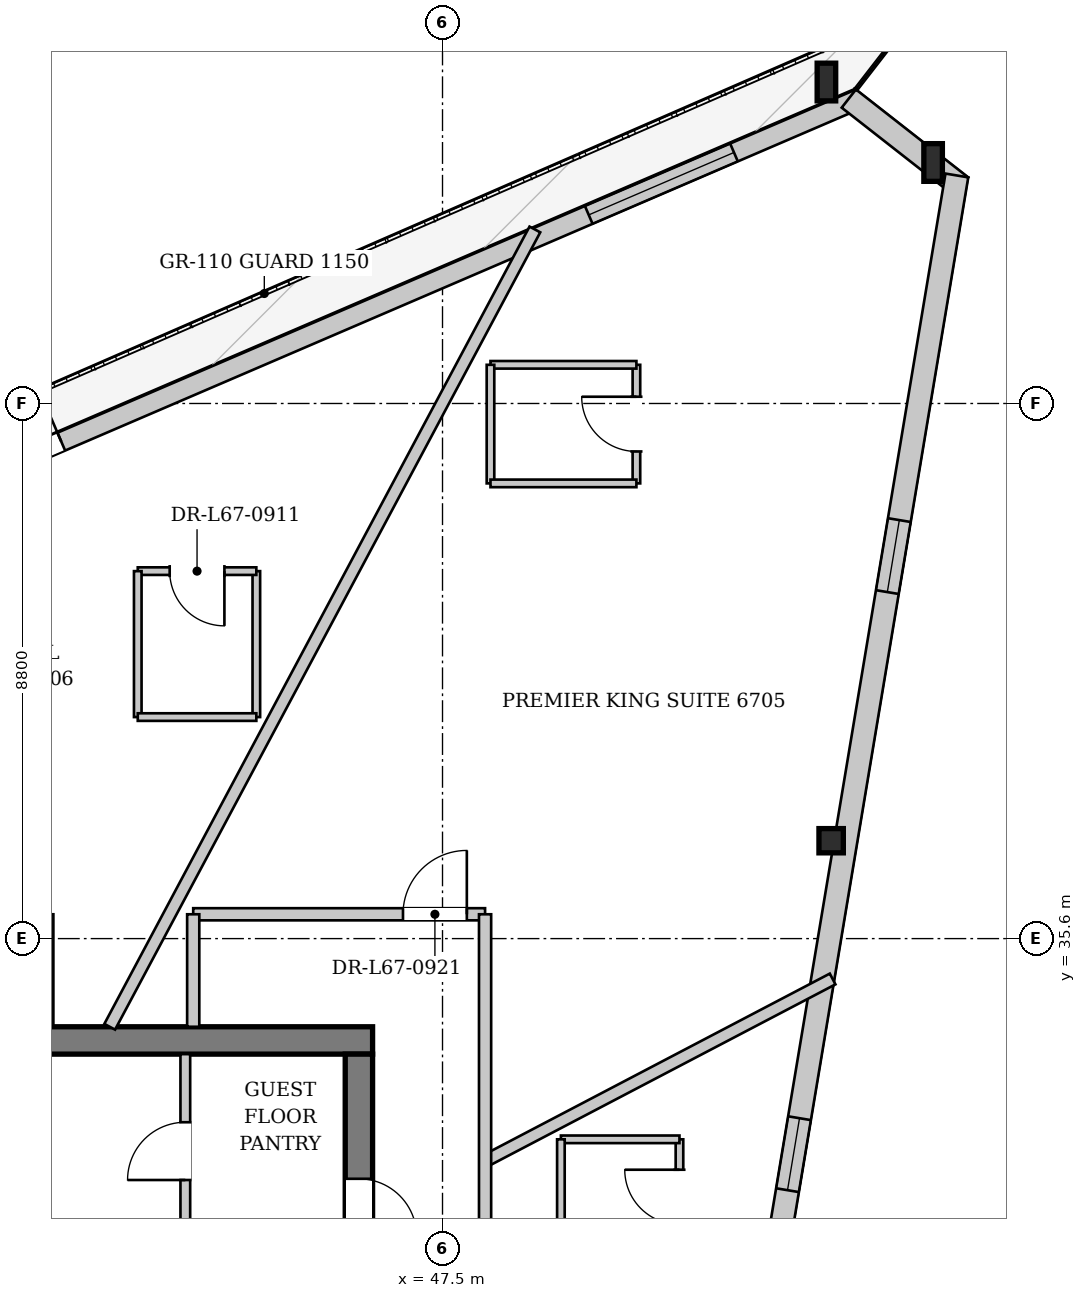
"""IFC4 building model, lengths in metres.
Left out: names, types, materials, properties, quantities, classifications, styles, units other than length and angle.
Written with IfcOpenShell. Run it as: python <this file> out.ifc"""

import sys

from ifc_helpers import new_model, si_unit, direction, frame, frame_2d, origin, origin_2d, place, context, subcontext, project, spatial, rectangle, i_section, extrude, source, transform, mapped, element, fill, save


model = new_model("IFC4")
c1 = context("Model", 3, precision=1e-05, world=origin(), true_north=direction((0.0, 1.0)))
c2 = subcontext(c1, "Body", "Model", "MODEL_VIEW")
j1 = project(units=[si_unit("LENGTHUNIT", "METRE"), si_unit("PLANEANGLEUNIT", "RADIAN")], contexts=[c1])
p1 = place(None, origin())
s1 = spatial("IfcSite", under=j1, at=p1, CompositionType="ELEMENT")
p2 = place(p1, origin())
s2 = spatial("IfcBuilding", under=s1, at=p2, CompositionType="ELEMENT")
p3 = place(p2, frame((0.0, 0.0, 252.5)))
s3 = spatial("IfcBuildingStorey", under=s2, at=p3, CompositionType="ELEMENT", Elevation=252.5)
m1 = source(origin(), c2, "Body", "SweptSolid", [
    extrude(i_section(OverallWidth=0.305, OverallDepth=0.62, WebThickness=0.021, FlangeThickness=0.04, at=origin_2d()), origin(), (0.0, 0.0, 1.0), 3.657),
])
p4 = place(p3, frame((56.146, 48.118, 0.0), z_axis=(-0.316024684734, 0.133846534198, 0.939262212549), x_axis=(-0.389995305072, -0.920816844993, 0.0)))
e1 = element("IfcColumn", 1, at=p4, inside=s3, PredefinedType="COLUMN", context=c2, shape_type="MappedRepresentation", body=[
    mapped(m1, transform((0.0, 0.0, 0.0), x_axis=(1.0, 0.0, 0.0), y_axis=(0.0, 1.0, 0.0), z_axis=(0.0, 0.0, 1.0), scale=1.0)),
])
m2 = source(origin(), c2, "Body", "SweptSolid", [
    extrude(i_section(OverallWidth=0.305, OverallDepth=0.62, WebThickness=0.021, FlangeThickness=0.04, at=origin_2d()), origin(), (0.0, 0.0, 1.0), 3.578),
])
p5 = place(p3, frame((54.299, 49.564, 0.0), z_axis=(-0.271302646107, 0.06830330703, 0.960067462455), x_axis=(-0.244142151433, -0.969739454644, 0.0)))
e2 = element("IfcColumn", 2, at=p5, inside=s3, PredefinedType="COLUMN", context=c2, shape_type="MappedRepresentation", body=[
    mapped(m2, transform((0.0, 0.0, 0.0), x_axis=(1.0, 0.0, 0.0), y_axis=(0.0, 1.0, 0.0), z_axis=(0.0, 0.0, 1.0), scale=1.0)),
])
m3 = source(origin(), c2, "Body", "SweptSolid", [
    extrude(i_section(OverallWidth=0.401, OverallDepth=0.399, WebThickness=0.022, FlangeThickness=0.034, at=origin_2d()), origin(), (0.0, 0.0, 1.0), 3.563),
])
p6 = place(p3, frame((54.281, 36.941, 0.0), z_axis=(-0.218659220589, 0.150478109813, 0.964128872983), x_axis=(-0.566912230463, -0.823778200095, 0.0)))
e3 = element("IfcColumn", 3, at=p6, inside=s3, PredefinedType="COLUMN", context=c2, shape_type="MappedRepresentation", body=[
    mapped(m3, transform((0.0, 0.0, 0.0), x_axis=(1.0, 0.0, 0.0), y_axis=(0.0, 1.0, 0.0), z_axis=(0.0, 0.0, 1.0), scale=1.0)),
])
p7 = place(p3, frame((34.037, 40.68, 0.0), z_axis=(0.0, 0.0, 1.0), x_axis=(0.918723841861, 0.394900623444, 0.0)))
e4 = element("IfcWall", 4, at=p7, inside=s3, PredefinedType="SOLIDWALL", context=c2, shape_type="SweptSolid", body=[
    extrude(rectangle(XDim=22.124, YDim=0.32, at=frame_2d((11.062, 0.0))), origin(), (0.0, 0.0, 1.0), 2.872),
])
p8 = place(p7, frame((6.33, 0.0, 0.0)))
e5 = element("IfcOpeningElement", 5, at=p8, cuts=e4, PredefinedType="OPENING", context=c2, shape_type="SweptSolid", body=[
    extrude(rectangle(XDim=1.5, YDim=2.3, at=frame_2d((0.75, 1.15))), frame((0.0, 0.17, 0.0), z_axis=(0.0, -1.0, 0.0), x_axis=(1.0, 0.0, 0.0)), (0.0, 0.0, 1.0), 0.34),
])
p9 = place(p7, frame((17.272, 0.0, 0.402)))
e6 = element("IfcOpeningElement", 6, at=p9, cuts=e4, PredefinedType="OPENING", context=c2, shape_type="SweptSolid", body=[
    extrude(rectangle(XDim=2.6, YDim=2.35, at=frame_2d((1.3, 1.175))), frame((0.0, 0.17, 0.0), z_axis=(0.0, -1.0, 0.0), x_axis=(1.0, 0.0, 0.0)), (0.0, 0.0, 1.0), 0.34),
])
p10 = place(p3, frame((54.182, 49.415, 0.0), z_axis=(0.0, 0.0, 1.0), x_axis=(0.787515983011, -0.616294228841, 0.0)))
e7 = element("IfcWall", 7, at=p10, inside=s3, PredefinedType="SOLIDWALL", context=c2, shape_type="SweptSolid", body=[
    extrude(rectangle(XDim=2.345, YDim=0.38, at=frame_2d((1.173, 0.0))), origin(), (0.0, 0.0, 1.0), 2.872),
])
p11 = place(p3, frame((55.959, 48.15, 0.0), z_axis=(0.0, 0.0, 1.0), x_axis=(-0.164634811141, -0.986354590885, 0.0)))
e8 = element("IfcWall", 8, at=p11, inside=s3, PredefinedType="SOLIDWALL", context=c2, shape_type="SweptSolid", body=[
    extrude(rectangle(XDim=22.664, YDim=0.38, at=frame_2d((11.332, 0.0))), origin(), (0.0, 0.0, 1.0), 2.872),
])
p12 = place(p11, frame((5.746, 0.0, 0.65)))
e9 = element("IfcOpeningElement", 9, at=p12, cuts=e8, PredefinedType="OPENING", context=c2, shape_type="SweptSolid", body=[
    extrude(rectangle(XDim=1.2, YDim=1.5, at=frame_2d((0.6, 0.75))), frame((0.0, 0.2, 0.0), z_axis=(0.0, -1.0, 0.0), x_axis=(1.0, 0.0, 0.0)), (0.0, 0.0, 1.0), 0.4),
])
p13 = place(p11, frame((15.718, 0.0, 0.65)))
e10 = element("IfcOpeningElement", 10, at=p13, cuts=e8, PredefinedType="OPENING", context=c2, shape_type="SweptSolid", body=[
    extrude(rectangle(XDim=1.2, YDim=1.5, at=frame_2d((0.6, 0.75))), frame((0.0, 0.2, 0.0), z_axis=(0.0, -1.0, 0.0), x_axis=(1.0, 0.0, 0.0)), (0.0, 0.0, 1.0), 0.4),
])
p14 = place(p3, frame((29.65, 33.925, 0.0), z_axis=(0.0, 0.0, 1.0), x_axis=(1.0, 0.0, 0.0)))
e11 = element("IfcWall", 11, at=p14, inside=s3, PredefinedType="SHEAR", context=c2, shape_type="SweptSolid", body=[
    extrude(rectangle(XDim=16.7, YDim=0.45, at=frame_2d((8.35, 0.0))), origin(), (0.0, 0.0, 1.0), 3.38),
])
p15 = place(p14, frame((1.45, 0.0, 0.0)))
e12 = element("IfcOpeningElement", 12, at=p15, cuts=e11, PredefinedType="OPENING", context=c2, shape_type="SweptSolid", body=[
    extrude(rectangle(XDim=0.95, YDim=2.1, at=frame_2d((0.475, 1.05))), frame((0.0, 0.235, 0.0), z_axis=(0.0, -1.0, 0.0), x_axis=(1.0, 0.0, 0.0)), (0.0, 0.0, 1.0), 0.47),
])
p16 = place(p14, frame((3.83, 0.0, 0.0)))
e13 = element("IfcOpeningElement", 13, at=p16, cuts=e11, PredefinedType="OPENING", context=c2, shape_type="SweptSolid", body=[
    extrude(rectangle(XDim=1.32, YDim=2.2, at=frame_2d((0.66, 1.1))), frame((0.0, 0.235, 0.0), z_axis=(0.0, -1.0, 0.0), x_axis=(1.0, 0.0, 0.0)), (0.0, 0.0, 1.0), 0.47),
])
p17 = place(p3, frame((46.125, 33.7, 0.0), z_axis=(0.0, 0.0, 1.0), x_axis=(0.0, -1.0, 0.0)))
e14 = element("IfcWall", 14, at=p17, inside=s3, PredefinedType="SHEAR", context=c2, shape_type="SweptSolid", body=[
    extrude(rectangle(XDim=14.2, YDim=0.45, at=frame_2d((7.1, 0.0))), origin(), (0.0, 0.0, 1.0), 3.38),
])
p18 = place(p17, frame((5.18, 0.0, 0.0)))
e15 = element("IfcOpeningElement", 15, at=p18, cuts=e14, PredefinedType="OPENING", context=c2, shape_type="SweptSolid", body=[
    extrude(rectangle(XDim=1.6, YDim=2.2, at=frame_2d((0.8, 1.1))), frame((0.0, 0.235, 0.0), z_axis=(0.0, -1.0, 0.0), x_axis=(1.0, 0.0, 0.0)), (0.0, 0.0, 1.0), 0.47),
])
p19 = place(p17, frame((2.05, 0.0, 0.0)))
e16 = element("IfcOpeningElement", 16, at=p19, cuts=e14, PredefinedType="OPENING", context=c2, shape_type="SweptSolid", body=[
    extrude(rectangle(XDim=0.95, YDim=2.1, at=frame_2d((0.475, 1.05))), frame((0.0, 0.235, 0.0), z_axis=(0.0, -1.0, 0.0), x_axis=(1.0, 0.0, 0.0)), (0.0, 0.0, 1.0), 0.47),
])
p20 = place(p3, frame((43.27, 30.68, 0.0), z_axis=(0.0, 0.0, 1.0), x_axis=(0.0, 1.0, 0.0)))
e17 = element("IfcWall", 17, at=p20, inside=s3, PredefinedType="PARTITIONING", context=c2, shape_type="SweptSolid", body=[
    extrude(rectangle(XDim=3.02, YDim=0.16, at=frame_2d((1.51, 0.0))), origin(), (0.0, 0.0, 1.0), 3.38),
])
p21 = place(p20, frame((0.95, 0.0, 0.0)))
e18 = element("IfcOpeningElement", 18, at=p21, cuts=e17, PredefinedType="OPENING", context=c2, shape_type="SweptSolid", body=[
    extrude(rectangle(XDim=0.95, YDim=2.1, at=frame_2d((0.475, 1.05))), frame((0.0, 0.09, 0.0), z_axis=(0.0, -1.0, 0.0), x_axis=(1.0, 0.0, 0.0)), (0.0, 0.0, 1.0), 0.18),
])
p22 = place(p3, frame((48.2, 31.942, 0.0), z_axis=(0.0, 0.0, 1.0), x_axis=(0.885861896698, 0.463949027349, 0.0)))
e19 = element("IfcWall", 19, at=p22, inside=s3, PredefinedType="PARTITIONING", context=c2, shape_type="SweptSolid", body=[
    extrude(rectangle(XDim=6.453, YDim=0.2, at=frame_2d((3.226, 0.0))), origin(), (0.0, 0.0, 1.0), 3.38),
])
p23 = place(p3, frame((42.027, 34.15, 0.0), z_axis=(0.0, 0.0, 1.0), x_axis=(0.47056606421, 0.882364765397, 0.0)))
e20 = element("IfcWall", 20, at=p23, inside=s3, PredefinedType="PARTITIONING", context=c2, shape_type="SweptSolid", body=[
    extrude(rectangle(XDim=14.86, YDim=0.2, at=frame_2d((7.43, 0.0))), origin(), (0.0, 0.0, 1.0), 3.38),
])
p24 = place(p3, frame((51.397, 30.399, 0.0), z_axis=(0.0, 0.0, 1.0), x_axis=(0.0, 1.0, 0.0)))
e21 = element("IfcWall", 21, at=p24, inside=s3, PredefinedType="PARTITIONING", context=c2, shape_type="SweptSolid", body=[
    extrude(rectangle(XDim=1.9, YDim=0.125, at=frame_2d((0.95, 0.0))), origin(), (0.0, 0.0, 1.0), 3.38),
])
p25 = place(p24, frame((0.5, 0.0, 0.0)))
e22 = element("IfcOpeningElement", 22, at=p25, cuts=e21, PredefinedType="OPENING", context=c2, shape_type="SweptSolid", body=[
    extrude(rectangle(XDim=0.9, YDim=2.1, at=frame_2d((0.45, 1.05))), frame((0.0, 0.073, 0.0), z_axis=(0.0, -1.0, 0.0), x_axis=(1.0, 0.0, 0.0)), (0.0, 0.0, 1.0), 0.145),
])
p26 = place(p3, frame((51.397, 32.299, 0.0), z_axis=(0.0, 0.0, 1.0), x_axis=(-1.0, 0.0, 0.0)))
e23 = element("IfcWall", 23, at=p26, inside=s3, PredefinedType="PARTITIONING", context=c2, shape_type="SweptSolid", body=[
    extrude(rectangle(XDim=1.95, YDim=0.125, at=frame_2d((0.975, 0.0))), origin(), (0.0, 0.0, 1.0), 3.38),
])
p27 = place(p3, frame((49.447, 32.299, 0.0), z_axis=(0.0, 0.0, 1.0), x_axis=(0.0, -1.0, 0.0)))
e24 = element("IfcWall", 24, at=p27, inside=s3, PredefinedType="PARTITIONING", context=c2, shape_type="SweptSolid", body=[
    extrude(rectangle(XDim=1.9, YDim=0.125, at=frame_2d((0.95, 0.0))), origin(), (0.0, 0.0, 1.0), 3.38),
])
p28 = place(p3, frame((50.689, 43.086, 0.0), z_axis=(0.0, 0.0, 1.0), x_axis=(0.0, 1.0, 0.0)))
e25 = element("IfcWall", 25, at=p28, inside=s3, PredefinedType="PARTITIONING", context=c2, shape_type="SweptSolid", body=[
    extrude(rectangle(XDim=1.95, YDim=0.125, at=frame_2d((0.975, 0.0))), origin(), (0.0, 0.0, 1.0), 3.38),
])
p29 = place(p28, frame((0.525, 0.0, 0.0)))
e26 = element("IfcOpeningElement", 26, at=p29, cuts=e25, PredefinedType="OPENING", context=c2, shape_type="SweptSolid", body=[
    extrude(rectangle(XDim=0.9, YDim=2.1, at=frame_2d((0.45, 1.05))), frame((0.0, 0.073, 0.0), z_axis=(0.0, -1.0, 0.0), x_axis=(1.0, 0.0, 0.0)), (0.0, 0.0, 1.0), 0.145),
])
p30 = place(p3, frame((50.689, 45.036, 0.0), z_axis=(0.0, 0.0, 1.0), x_axis=(-1.0, 0.0, 0.0)))
e27 = element("IfcWall", 27, at=p30, inside=s3, PredefinedType="PARTITIONING", context=c2, shape_type="SweptSolid", body=[
    extrude(rectangle(XDim=2.4, YDim=0.125, at=frame_2d((1.2, 0.0))), origin(), (0.0, 0.0, 1.0), 3.38),
])
p31 = place(p3, frame((48.289, 45.036, 0.0), z_axis=(0.0, 0.0, 1.0), x_axis=(0.0, -1.0, 0.0)))
e28 = element("IfcWall", 28, at=p31, inside=s3, PredefinedType="PARTITIONING", context=c2, shape_type="SweptSolid", body=[
    extrude(rectangle(XDim=1.95, YDim=0.125, at=frame_2d((0.975, 0.0))), origin(), (0.0, 0.0, 1.0), 3.38),
])
p32 = place(p3, frame((48.289, 43.086, 0.0), z_axis=(0.0, 0.0, 1.0), x_axis=(1.0, 0.0, 0.0)))
e29 = element("IfcWall", 29, at=p32, inside=s3, PredefinedType="PARTITIONING", context=c2, shape_type="SweptSolid", body=[
    extrude(rectangle(XDim=2.4, YDim=0.125, at=frame_2d((1.2, 0.0))), origin(), (0.0, 0.0, 1.0), 3.125),
])
p33 = place(p3, frame((44.438, 39.243, 0.0), z_axis=(0.0, 0.0, 1.0), x_axis=(0.0, 1.0, 0.0)))
e30 = element("IfcWall", 30, at=p33, inside=s3, PredefinedType="PARTITIONING", context=c2, shape_type="SweptSolid", body=[
    extrude(rectangle(XDim=2.4, YDim=0.125, at=frame_2d((1.2, 0.0))), origin(), (0.0, 0.0, 1.0), 3.38),
])
p34 = place(p3, frame((44.438, 41.643, 0.0), z_axis=(0.0, 0.0, 1.0), x_axis=(-1.0, 0.0, 0.0)))
e31 = element("IfcWall", 31, at=p34, inside=s3, PredefinedType="PARTITIONING", context=c2, shape_type="SweptSolid", body=[
    extrude(rectangle(XDim=1.95, YDim=0.125, at=frame_2d((0.975, 0.0))), origin(), (0.0, 0.0, 1.0), 3.125),
])
p35 = place(p34, frame((0.525, 0.0, 0.0)))
e32 = element("IfcOpeningElement", 32, at=p35, cuts=e31, PredefinedType="OPENING", context=c2, shape_type="SweptSolid", body=[
    extrude(rectangle(XDim=0.9, YDim=2.1, at=frame_2d((0.45, 1.05))), frame((0.0, 0.073, 0.0), z_axis=(0.0, -1.0, 0.0), x_axis=(1.0, 0.0, 0.0)), (0.0, 0.0, 1.0), 0.145),
])
p36 = place(p3, frame((42.488, 41.643, 0.0), z_axis=(0.0, 0.0, 1.0), x_axis=(0.0, -1.0, 0.0)))
e33 = element("IfcWall", 33, at=p36, inside=s3, PredefinedType="PARTITIONING", context=c2, shape_type="SweptSolid", body=[
    extrude(rectangle(XDim=2.4, YDim=0.125, at=frame_2d((1.2, 0.0))), origin(), (0.0, 0.0, 1.0), 3.38),
])
p37 = place(p3, frame((42.488, 39.243, 0.0), z_axis=(0.0, 0.0, 1.0), x_axis=(1.0, 0.0, 0.0)))
e34 = element("IfcWall", 34, at=p37, inside=s3, PredefinedType="PARTITIONING", context=c2, shape_type="SweptSolid", body=[
    extrude(rectangle(XDim=1.95, YDim=0.125, at=frame_2d((0.975, 0.0))), origin(), (0.0, 0.0, 1.0), 3.38),
])
p38 = place(p3, frame((41.0, 34.15, 0.0), z_axis=(0.0, 0.0, 1.0), x_axis=(0.0, 1.0, 0.0)))
e35 = element("IfcWall", 35, at=p38, inside=s3, PredefinedType="PARTITIONING", context=c2, shape_type="SweptSolid", body=[
    extrude(rectangle(XDim=1.85, YDim=0.2, at=frame_2d((0.925, 0.0))), origin(), (0.0, 0.0, 1.0), 3.38),
])
p39 = place(p3, frame((43.4, 36.0, 0.0), z_axis=(0.0, 0.0, 1.0), x_axis=(1.0, 0.0, 0.0)))
e36 = element("IfcWall", 36, at=p39, inside=s3, PredefinedType="PARTITIONING", context=c2, shape_type="SweptSolid", body=[
    extrude(rectangle(XDim=4.8, YDim=0.2, at=frame_2d((2.4, 0.0))), origin(), (0.0, 0.0, 1.0), 3.38),
])
p40 = place(p39, frame((3.45, 0.0, 0.0)))
e37 = element("IfcOpeningElement", 37, at=p40, cuts=e36, PredefinedType="OPENING", context=c2, shape_type="SweptSolid", body=[
    extrude(rectangle(XDim=1.05, YDim=2.2, at=frame_2d((0.525, 1.1))), frame((0.0, 0.11, 0.0), z_axis=(0.0, -1.0, 0.0), x_axis=(1.0, 0.0, 0.0)), (0.0, 0.0, 1.0), 0.22),
])
p41 = place(p3, frame((43.4, 34.15, 0.0), z_axis=(0.0, 0.0, 1.0), x_axis=(0.0, 1.0, 0.0)))
e38 = element("IfcWall", 38, at=p41, inside=s3, PredefinedType="PARTITIONING", context=c2, shape_type="SweptSolid", body=[
    extrude(rectangle(XDim=1.85, YDim=0.2, at=frame_2d((0.925, 0.0))), origin(), (0.0, 0.0, 1.0), 3.38),
])
p42 = place(p3, frame((48.2, 17.2, 0.0), z_axis=(0.0, 0.0, 1.0), x_axis=(0.0, 1.0, 0.0)))
e39 = element("IfcWall", 39, at=p42, inside=s3, PredefinedType="PARTITIONING", context=c2, shape_type="SweptSolid", body=[
    extrude(rectangle(XDim=18.8, YDim=0.2, at=frame_2d((9.4, 0.0))), origin(), (0.0, 0.0, 1.0), 3.065),
])
p43 = place(p42, frame((3.607, 0.0, 0.0)))
e40 = element("IfcOpeningElement", 40, at=p43, cuts=e39, PredefinedType="OPENING", context=c2, shape_type="SweptSolid", body=[
    extrude(rectangle(XDim=1.05, YDim=2.2, at=frame_2d((0.525, 1.1))), frame((0.0, 0.11, 0.0), z_axis=(0.0, -1.0, 0.0), x_axis=(1.0, 0.0, 0.0)), (0.0, 0.0, 1.0), 0.22),
])
p44 = place(p42, frame((10.359, 0.0, 0.0)))
e41 = element("IfcOpeningElement", 41, at=p44, cuts=e39, PredefinedType="OPENING", context=c2, shape_type="SweptSolid", body=[
    extrude(rectangle(XDim=1.05, YDim=2.2, at=frame_2d((0.525, 1.1))), frame((0.0, 0.11, 0.0), z_axis=(0.0, -1.0, 0.0), x_axis=(1.0, 0.0, 0.0)), (0.0, 0.0, 1.0), 0.22),
])
m4 = source(origin(), c2, "Body", "SweptSolid", [
    extrude(rectangle(XDim=1.5, YDim=2.3, at=frame_2d((0.75, 1.15))), frame((0.0, 0.025, 0.0), z_axis=(0.0, -1.0, 0.0), x_axis=(1.0, 0.0, 0.0)), (0.0, 0.0, 1.0), 0.05),
])
p45 = place(p8, origin())
e42 = element("IfcDoor", 42, at=p45, inside=s3, OperationType="DOUBLE_DOOR_SINGLE_SWING", PredefinedType="DOOR", context=c2, shape_type="MappedRepresentation", body=[
    mapped(m4, transform((0.0, 0.0, 0.0), x_axis=(1.0, 0.0, 0.0), y_axis=(0.0, 1.0, 0.0), z_axis=(0.0, 0.0, 1.0), scale=1.0)),
])
fill(e5, e42)
m5 = source(origin(), c2, "Body", "SweptSolid", [
    extrude(rectangle(XDim=2.6, YDim=2.35, at=frame_2d((1.3, 1.175))), frame((0.0, 0.03, 0.0), z_axis=(0.0, -1.0, 0.0), x_axis=(1.0, 0.0, 0.0)), (0.0, 0.0, 1.0), 0.06),
])
p46 = place(p9, origin())
e43 = element("IfcWindow", 43, at=p46, inside=s3, PartitioningType="SINGLE_PANEL", PredefinedType="WINDOW", context=c2, shape_type="MappedRepresentation", body=[
    mapped(m5, transform((0.0, 0.0, 0.0), x_axis=(1.0, 0.0, 0.0), y_axis=(0.0, 1.0, 0.0), z_axis=(0.0, 0.0, 1.0), scale=1.0)),
])
fill(e6, e43)
m6 = source(origin(), c2, "Body", "SweptSolid", [
    extrude(rectangle(XDim=1.2, YDim=1.5, at=frame_2d((0.6, 0.75))), frame((0.0, 0.03, 0.0), z_axis=(0.0, -1.0, 0.0), x_axis=(1.0, 0.0, 0.0)), (0.0, 0.0, 1.0), 0.06),
])
p47 = place(p12, origin())
e44 = element("IfcWindow", 44, at=p47, inside=s3, PartitioningType="SINGLE_PANEL", PredefinedType="WINDOW", context=c2, shape_type="MappedRepresentation", body=[
    mapped(m6, transform((0.0, 0.0, 0.0), x_axis=(1.0, 0.0, 0.0), y_axis=(0.0, 1.0, 0.0), z_axis=(0.0, 0.0, 1.0), scale=1.0)),
])
fill(e9, e44)
p48 = place(p13, origin())
e45 = element("IfcWindow", 45, at=p48, inside=s3, PartitioningType="SINGLE_PANEL", PredefinedType="WINDOW", context=c2, shape_type="MappedRepresentation", body=[
    mapped(m6, transform((0.0, 0.0, 0.0), x_axis=(1.0, 0.0, 0.0), y_axis=(0.0, 1.0, 0.0), z_axis=(0.0, 0.0, 1.0), scale=1.0)),
])
fill(e10, e45)
m7 = source(origin(), c2, "Body", "SweptSolid", [
    extrude(rectangle(XDim=0.95, YDim=2.1, at=frame_2d((0.475, 1.05))), frame((0.0, 0.025, 0.0), z_axis=(0.0, -1.0, 0.0), x_axis=(1.0, 0.0, 0.0)), (0.0, 0.0, 1.0), 0.05),
])
p49 = place(p21, origin())
e46 = element("IfcDoor", 46, at=p49, inside=s3, OperationType="SINGLE_SWING_LEFT", PredefinedType="DOOR", context=c2, shape_type="MappedRepresentation", body=[
    mapped(m7, transform((0.0, 0.0, 0.0), x_axis=(1.0, 0.0, 0.0), y_axis=(0.0, 1.0, 0.0), z_axis=(0.0, 0.0, 1.0), scale=1.0)),
])
fill(e18, e46)
p50 = place(p19, origin())
e47 = element("IfcDoor", 47, at=p50, inside=s3, OperationType="SINGLE_SWING_RIGHT", PredefinedType="DOOR", context=c2, shape_type="MappedRepresentation", body=[
    mapped(m7, transform((0.0, 0.0, 0.0), x_axis=(1.0, 0.0, 0.0), y_axis=(0.0, 1.0, 0.0), z_axis=(0.0, 0.0, 1.0), scale=1.0)),
])
fill(e16, e47)
m8 = source(origin(), c2, "Body", "SweptSolid", [
    extrude(rectangle(XDim=0.9, YDim=2.1, at=frame_2d((0.45, 1.05))), frame((0.0, 0.025, 0.0), z_axis=(0.0, -1.0, 0.0), x_axis=(1.0, 0.0, 0.0)), (0.0, 0.0, 1.0), 0.05),
])
p51 = place(p25, origin())
e48 = element("IfcDoor", 48, at=p51, inside=s3, OperationType="SINGLE_SWING_RIGHT", PredefinedType="DOOR", context=c2, shape_type="MappedRepresentation", body=[
    mapped(m8, transform((0.0, 0.0, 0.0), x_axis=(1.0, 0.0, 0.0), y_axis=(0.0, 1.0, 0.0), z_axis=(0.0, 0.0, 1.0), scale=1.0)),
])
fill(e22, e48)
p52 = place(p29, origin())
e49 = element("IfcDoor", 49, at=p52, inside=s3, OperationType="SINGLE_SWING_RIGHT", PredefinedType="DOOR", context=c2, shape_type="MappedRepresentation", body=[
    mapped(m8, transform((0.0, 0.0, 0.0), x_axis=(1.0, 0.0, 0.0), y_axis=(0.0, 1.0, 0.0), z_axis=(0.0, 0.0, 1.0), scale=1.0)),
])
fill(e26, e49)
p53 = place(p35, origin())
e50 = element("IfcDoor", 50, at=p53, inside=s3, OperationType="SINGLE_SWING_LEFT", PredefinedType="DOOR", context=c2, shape_type="MappedRepresentation", body=[
    mapped(m8, transform((0.0, 0.0, 0.0), x_axis=(1.0, 0.0, 0.0), y_axis=(0.0, 1.0, 0.0), z_axis=(0.0, 0.0, 1.0), scale=1.0)),
])
fill(e32, e50)
m9 = source(origin(), c2, "Body", "SweptSolid", [
    extrude(rectangle(XDim=1.05, YDim=2.2, at=frame_2d((0.525, 1.1))), frame((0.0, 0.025, 0.0), z_axis=(0.0, -1.0, 0.0), x_axis=(1.0, 0.0, 0.0)), (0.0, 0.0, 1.0), 0.05),
])
p54 = place(p40, origin())
e51 = element("IfcDoor", 51, at=p54, inside=s3, OperationType="SINGLE_SWING_RIGHT", PredefinedType="DOOR", context=c2, shape_type="MappedRepresentation", body=[
    mapped(m9, transform((0.0, 0.0, 0.0), x_axis=(1.0, 0.0, 0.0), y_axis=(0.0, 1.0, 0.0), z_axis=(0.0, 0.0, 1.0), scale=1.0)),
])
fill(e37, e51)
save(model, sys.argv[1])
